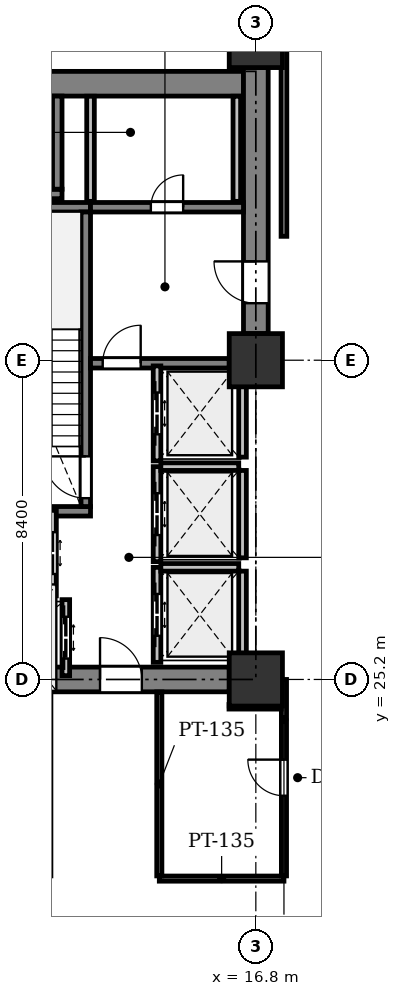
"""IFC4 building model, lengths in metres.
Left out: names, types, materials, properties, quantities, classifications, styles, units other than length and angle.
Written with IfcOpenShell. Run it as: python <this file> out.ifc"""

import sys

from ifc_helpers import new_model, si_unit, direction, frame, frame_2d, origin, origin_2d, place, context, subcontext, project, spatial, rectangle, extrude, element, fill, save


model = new_model("IFC4")
c1 = context("Model", 3, precision=1e-05, world=origin(), true_north=direction((0.0, 1.0)))
c2 = subcontext(c1, "Body", "Model", "MODEL_VIEW")
j1 = project(units=[si_unit("LENGTHUNIT", "METRE"), si_unit("PLANEANGLEUNIT", "RADIAN")], contexts=[c1])
p1 = place(None, origin())
s1 = spatial("IfcSite", under=j1, at=p1, CompositionType="ELEMENT")
p2 = place(p1, origin())
s2 = spatial("IfcBuilding", under=s1, at=p2, CompositionType="ELEMENT")
p3 = place(p2, frame((0.0, 0.0, 71.0)))
s3 = spatial("IfcBuildingStorey", under=s2, at=p3, CompositionType="ELEMENT", Elevation=71.0)
for number, where, z_axis, x_axis in (
    (1, (16.8, 25.2, 0.0), (0.0, 0.0, 1.0), (1.0, 0.0, 0.0)),
    (2, (16.8, 33.6, 0.0), (0.0, 0.0, 1.0), (1.0, 0.0, 0.0)),
    (3, (16.8, 42.0, 0.0), (0.0, 0.0, 1.0), (1.0, 0.0, 0.0)),
):
    element("IfcColumn", number, at=place(p3, frame(where, z_axis=z_axis, x_axis=x_axis)), inside=s3, PredefinedType="COLUMN", context=c2, shape_type="SweptSolid", body=[
        extrude(rectangle(XDim=1.4, YDim=1.4, at=origin_2d()), origin(), (0.0, 0.0, 1.0), 4.2),
    ])
p4 = place(p3, frame((8.725, 40.875, 0.0), z_axis=(0.0, 0.0, 1.0), x_axis=(1.0, 0.0, 0.0)))
e4 = element("IfcWall", 4, at=p4, inside=s3, PredefinedType="SHEAR", context=c2, shape_type="SweptSolid", body=[
    extrude(rectangle(XDim=7.75, YDim=0.65, at=frame_2d((3.875, 0.0))), origin(), (0.0, 0.0, 1.0), 3.925),
])
p5 = place(p3, frame((16.8, 34.3, 0.0), z_axis=(0.0, 0.0, 1.0), x_axis=(0.0, 1.0, 0.0)))
e5 = element("IfcWall", 5, at=p5, inside=s3, PredefinedType="SHEAR", context=c2, shape_type="SweptSolid", body=[
    extrude(rectangle(XDim=7.0, YDim=0.65, at=frame_2d((3.5, 0.0))), origin(), (0.0, 0.0, 1.0), 3.925),
])
p6 = place(p5, frame((0.8, 0.0, 0.0)))
e6 = element("IfcOpeningElement", 6, at=p6, cuts=e5, PredefinedType="OPENING", context=c2, shape_type="SweptSolid", body=[
    extrude(rectangle(XDim=1.1, YDim=2.15, at=frame_2d((0.55, 1.075))), frame((0.0, 0.335, 0.0), z_axis=(0.0, -1.0, 0.0), x_axis=(1.0, 0.0, 0.0)), (0.0, 0.0, 1.0), 0.67),
])
p7 = place(p3, frame((9.1, 25.2, 0.0), z_axis=(0.0, 0.0, 1.0), x_axis=(1.0, 0.0, 0.0)))
e7 = element("IfcWall", 7, at=p7, inside=s3, PredefinedType="SHEAR", context=c2, shape_type="SweptSolid", body=[
    extrude(rectangle(XDim=7.0, YDim=0.65, at=frame_2d((3.5, 0.0))), origin(), (0.0, 0.0, 1.0), 3.925),
])
p8 = place(p7, frame((3.6, 0.0, 0.0)))
e8 = element("IfcOpeningElement", 8, at=p8, cuts=e7, PredefinedType="OPENING", context=c2, shape_type="SweptSolid", body=[
    extrude(rectangle(XDim=1.1, YDim=2.15, at=frame_2d((0.55, 1.075))), frame((0.0, 0.335, 0.0), z_axis=(0.0, -1.0, 0.0), x_axis=(1.0, 0.0, 0.0)), (0.0, 0.0, 1.0), 0.67),
])
for number, where, z_axis, x_axis in (
    (9, (12.45, 29.625, 0.0), (0.0, 0.0, 1.0), (-1.0, 0.0, 0.0)),
    (10, (12.45, 37.625, 0.0), (0.0, 0.0, 1.0), (-1.0, 0.0, 0.0)),
):
    element("IfcWall", number, at=place(p3, frame(where, z_axis=z_axis, x_axis=x_axis)), inside=s3, PredefinedType="SHEAR", context=c2, shape_type="SweptSolid", body=[
        extrude(rectangle(XDim=3.75, YDim=0.25, at=frame_2d((1.875, 0.0))), origin(), (0.0, 0.0, 1.0), 3.925),
    ])
p9 = place(p3, frame((12.325, 29.75, 0.0), z_axis=(0.0, 0.0, 1.0), x_axis=(0.0, 1.0, 0.0)))
e11 = element("IfcWall", 11, at=p9, inside=s3, PredefinedType="SHEAR", context=c2, shape_type="SweptSolid", body=[
    extrude(rectangle(XDim=7.75, YDim=0.25, at=frame_2d((3.875, 0.0))), origin(), (0.0, 0.0, 1.0), 3.925),
])
p10 = place(p9, frame((0.22, 0.0, 0.0)))
e12 = element("IfcOpeningElement", 12, at=p10, cuts=e11, PredefinedType="OPENING", context=c2, shape_type="SweptSolid", body=[
    extrude(rectangle(XDim=1.1, YDim=2.15, at=frame_2d((0.55, 1.075))), frame((0.0, 0.135, 0.0), z_axis=(0.0, -1.0, 0.0), x_axis=(1.0, 0.0, 0.0)), (0.0, 0.0, 1.0), 0.27),
])
p11 = place(p3, frame((8.725, 37.975, 0.0), z_axis=(0.0, 0.0, 1.0), x_axis=(1.0, 0.0, 0.0)))
e13 = element("IfcWall", 13, at=p11, inside=s3, PredefinedType="SHEAR", context=c2, shape_type="SweptSolid", body=[
    extrude(rectangle(XDim=2.975, YDim=0.25, at=frame_2d((1.487, 0.0))), origin(), (0.0, 0.0, 1.0), 3.925),
])
p12 = place(p3, frame((11.575, 38.1, 0.0), z_axis=(0.0, 0.0, 1.0), x_axis=(0.0, 1.0, 0.0)))
e14 = element("IfcWall", 14, at=p12, inside=s3, PredefinedType="SHEAR", context=c2, shape_type="SweptSolid", body=[
    extrude(rectangle(XDim=2.45, YDim=0.25, at=frame_2d((1.225, 0.0))), origin(), (0.0, 0.0, 1.0), 3.925),
])
p13 = place(p3, frame((12.45, 33.52, 0.0), z_axis=(0.0, 0.0, 1.0), x_axis=(1.0, 0.0, 0.0)))
e15 = element("IfcWall", 15, at=p13, inside=s3, PredefinedType="SHEAR", context=c2, shape_type="SweptSolid", body=[
    extrude(rectangle(XDim=3.65, YDim=0.25, at=frame_2d((1.825, 0.0))), origin(), (0.0, 0.0, 1.0), 3.925),
])
p14 = place(p13, frame((0.32, 0.0, 0.0)))
e16 = element("IfcOpeningElement", 16, at=p14, cuts=e15, PredefinedType="OPENING", context=c2, shape_type="SweptSolid", body=[
    extrude(rectangle(XDim=1.0, YDim=2.15, at=frame_2d((0.5, 1.075))), frame((0.0, 0.135, 0.0), z_axis=(0.0, -1.0, 0.0), x_axis=(1.0, 0.0, 0.0)), (0.0, 0.0, 1.0), 0.27),
])
p15 = place(p3, frame((12.45, 37.625, 0.0), z_axis=(0.0, 0.0, 1.0), x_axis=(1.0, 0.0, 0.0)))
e17 = element("IfcWall", 17, at=p15, inside=s3, PredefinedType="SHEAR", context=c2, shape_type="SweptSolid", body=[
    extrude(rectangle(XDim=4.025, YDim=0.25, at=frame_2d((2.013, 0.0))), origin(), (0.0, 0.0, 1.0), 3.925),
])
p16 = place(p15, frame((1.587, 0.0, 0.0)))
e18 = element("IfcOpeningElement", 18, at=p16, cuts=e17, PredefinedType="OPENING", context=c2, shape_type="SweptSolid", body=[
    extrude(rectangle(XDim=0.85, YDim=2.15, at=frame_2d((0.425, 1.075))), frame((0.0, 0.135, 0.0), z_axis=(0.0, -1.0, 0.0), x_axis=(1.0, 0.0, 0.0)), (0.0, 0.0, 1.0), 0.27),
])
p17 = place(p3, frame((11.45, 27.4, 0.0), z_axis=(0.0, 0.0, 1.0), x_axis=(0.0, 1.0, 0.0)))
e19 = element("IfcWall", 19, at=p17, inside=s3, PredefinedType="PARTITIONING", context=c2, shape_type="SweptSolid", body=[
    extrude(rectangle(XDim=2.25, YDim=0.2, at=frame_2d((1.125, 0.0))), origin(), (0.0, 0.0, 1.0), 3.925),
])
p18 = place(p17, frame((0.575, 0.0, 0.0)))
e20 = element("IfcOpeningElement", 20, at=p18, cuts=e19, PredefinedType="OPENING", context=c2, shape_type="SweptSolid", body=[
    extrude(rectangle(XDim=1.1, YDim=2.2, at=frame_2d((0.55, 1.1))), frame((0.0, 0.11, 0.0), z_axis=(0.0, -1.0, 0.0), x_axis=(1.0, 0.0, 0.0)), (0.0, 0.0, 1.0), 0.22),
])
p19 = place(p3, frame((11.8, 25.3, 0.0), z_axis=(0.0, 0.0, 1.0), x_axis=(0.0, 1.0, 0.0)))
e21 = element("IfcWall", 21, at=p19, inside=s3, PredefinedType="PARTITIONING", context=c2, shape_type="SweptSolid", body=[
    extrude(rectangle(XDim=2.0, YDim=0.2, at=frame_2d((1.0, 0.0))), origin(), (0.0, 0.0, 1.0), 3.925),
])
p20 = place(p19, frame((0.45, 0.0, 0.0)))
e22 = element("IfcOpeningElement", 22, at=p20, cuts=e21, PredefinedType="OPENING", context=c2, shape_type="SweptSolid", body=[
    extrude(rectangle(XDim=1.1, YDim=2.2, at=frame_2d((0.55, 1.1))), frame((0.0, 0.11, 0.0), z_axis=(0.0, -1.0, 0.0), x_axis=(1.0, 0.0, 0.0)), (0.0, 0.0, 1.0), 0.22),
])
p21 = place(p3, frame((14.2, 25.65, 0.0), z_axis=(0.0, 0.0, 1.0), x_axis=(0.0, 1.0, 0.0)))
e23 = element("IfcWall", 23, at=p21, inside=s3, PredefinedType="PARTITIONING", context=c2, shape_type="SweptSolid", body=[
    extrude(rectangle(XDim=2.5, YDim=0.2, at=frame_2d((1.25, 0.0))), origin(), (0.0, 0.0, 1.0), 3.925),
])
p22 = place(p21, frame((0.7, 0.0, 0.0)))
e24 = element("IfcOpeningElement", 24, at=p22, cuts=e23, PredefinedType="OPENING", context=c2, shape_type="SweptSolid", body=[
    extrude(rectangle(XDim=1.1, YDim=2.2, at=frame_2d((0.55, 1.1))), frame((0.0, 0.11, 0.0), z_axis=(0.0, -1.0, 0.0), x_axis=(1.0, 0.0, 0.0)), (0.0, 0.0, 1.0), 0.22),
])
p23 = place(p3, frame((16.45, 25.75, 0.0), z_axis=(0.0, 0.0, 1.0), x_axis=(0.0, 1.0, 0.0)))
e25 = element("IfcWall", 25, at=p23, inside=s3, PredefinedType="PARTITIONING", context=c2, shape_type="SweptSolid", body=[
    extrude(rectangle(XDim=2.3, YDim=0.2, at=frame_2d((1.15, 0.0))), origin(), (0.0, 0.0, 1.0), 3.925),
])
p24 = place(p3, frame((14.3, 28.15, 0.0), z_axis=(0.0, 0.0, 1.0), x_axis=(1.0, 0.0, 0.0)))
e26 = element("IfcWall", 26, at=p24, inside=s3, PredefinedType="PARTITIONING", context=c2, shape_type="SweptSolid", body=[
    extrude(rectangle(XDim=2.05, YDim=0.2, at=frame_2d((1.025, 0.0))), origin(), (0.0, 0.0, 1.0), 3.925),
])
p25 = place(p3, frame((14.2, 28.3, 0.0), z_axis=(0.0, 0.0, 1.0), x_axis=(0.0, 1.0, 0.0)))
e27 = element("IfcWall", 27, at=p25, inside=s3, PredefinedType="PARTITIONING", context=c2, shape_type="SweptSolid", body=[
    extrude(rectangle(XDim=2.5, YDim=0.2, at=frame_2d((1.25, 0.0))), origin(), (0.0, 0.0, 1.0), 3.925),
])
p26 = place(p25, frame((0.7, 0.0, 0.0)))
e28 = element("IfcOpeningElement", 28, at=p26, cuts=e27, PredefinedType="OPENING", context=c2, shape_type="SweptSolid", body=[
    extrude(rectangle(XDim=1.1, YDim=2.2, at=frame_2d((0.55, 1.1))), frame((0.0, 0.11, 0.0), z_axis=(0.0, -1.0, 0.0), x_axis=(1.0, 0.0, 0.0)), (0.0, 0.0, 1.0), 0.22),
])
p27 = place(p3, frame((16.45, 28.4, 0.0), z_axis=(0.0, 0.0, 1.0), x_axis=(0.0, 1.0, 0.0)))
e29 = element("IfcWall", 29, at=p27, inside=s3, PredefinedType="PARTITIONING", context=c2, shape_type="SweptSolid", body=[
    extrude(rectangle(XDim=2.3, YDim=0.2, at=frame_2d((1.15, 0.0))), origin(), (0.0, 0.0, 1.0), 3.925),
])
p28 = place(p3, frame((14.3, 30.8, 0.0), z_axis=(0.0, 0.0, 1.0), x_axis=(1.0, 0.0, 0.0)))
e30 = element("IfcWall", 30, at=p28, inside=s3, PredefinedType="PARTITIONING", context=c2, shape_type="SweptSolid", body=[
    extrude(rectangle(XDim=2.05, YDim=0.2, at=frame_2d((1.025, 0.0))), origin(), (0.0, 0.0, 1.0), 3.925),
])
p29 = place(p3, frame((14.2, 30.95, 0.0), z_axis=(0.0, 0.0, 1.0), x_axis=(0.0, 1.0, 0.0)))
e31 = element("IfcWall", 31, at=p29, inside=s3, PredefinedType="PARTITIONING", context=c2, shape_type="SweptSolid", body=[
    extrude(rectangle(XDim=2.5, YDim=0.2, at=frame_2d((1.25, 0.0))), origin(), (0.0, 0.0, 1.0), 3.925),
])
p30 = place(p29, frame((0.7, 0.0, 0.0)))
e32 = element("IfcOpeningElement", 32, at=p30, cuts=e31, PredefinedType="OPENING", context=c2, shape_type="SweptSolid", body=[
    extrude(rectangle(XDim=1.1, YDim=2.2, at=frame_2d((0.55, 1.1))), frame((0.0, 0.11, 0.0), z_axis=(0.0, -1.0, 0.0), x_axis=(1.0, 0.0, 0.0)), (0.0, 0.0, 1.0), 0.22),
])
p31 = place(p3, frame((16.45, 31.05, 0.0), z_axis=(0.0, 0.0, 1.0), x_axis=(0.0, 1.0, 0.0)))
e33 = element("IfcWall", 33, at=p31, inside=s3, PredefinedType="PARTITIONING", context=c2, shape_type="SweptSolid", body=[
    extrude(rectangle(XDim=2.3, YDim=0.2, at=frame_2d((1.15, 0.0))), origin(), (0.0, 0.0, 1.0), 3.925),
])
for number, where, z_axis, x_axis in (
    (34, (16.3, 37.78, 0.0), (0.0, 0.0, 1.0), (0.0, 1.0, 0.0)),
    (35, (12.45, 40.546, 0.0), (0.0, 0.0, 1.0), (0.0, -1.0, 0.0)),
):
    element("IfcWall", number, at=place(p3, frame(where, z_axis=z_axis, x_axis=x_axis)), inside=s3, PredefinedType="PARTITIONING", context=c2, shape_type="SweptSolid", body=[
        extrude(rectangle(XDim=2.766, YDim=0.2, at=frame_2d((1.383, 0.0))), origin(), (0.0, 0.0, 1.0), 2.825),
    ])
p32 = place(p3, frame((14.26, 19.96, 0.0), z_axis=(0.0, 0.0, 1.0), x_axis=(1.0, 0.0, 0.0)))
e36 = element("IfcWall", 36, at=p32, inside=s3, PredefinedType="PARTITIONING", context=c2, shape_type="SweptSolid", body=[
    extrude(rectangle(XDim=3.28, YDim=0.135, at=frame_2d((1.64, 0.0))), origin(), (0.0, 0.0, 1.0), 3.323),
])
p33 = place(p3, frame((17.54, 20.031, 0.0), z_axis=(0.0, 0.0, 1.0), x_axis=(0.0, 1.0, 0.0)))
e37 = element("IfcWall", 37, at=p33, inside=s3, PredefinedType="PARTITIONING", context=c2, shape_type="SweptSolid", body=[
    extrude(rectangle(XDim=5.168, YDim=0.135, at=frame_2d((2.584, 0.0))), origin(), (0.0, 0.0, 1.0), 3.313),
])
p34 = place(p33, frame((2.109, 0.0, 0.0)))
e38 = element("IfcOpeningElement", 38, at=p34, cuts=e37, PredefinedType="OPENING", context=c2, shape_type="SweptSolid", body=[
    extrude(rectangle(XDim=0.95, YDim=2.15, at=frame_2d((0.475, 1.075))), frame((0.0, 0.077, 0.0), z_axis=(0.0, -1.0, 0.0), x_axis=(1.0, 0.0, 0.0)), (0.0, 0.0, 1.0), 0.155),
])
p35 = place(p3, frame((17.469, 24.48, 0.0), z_axis=(0.0, 0.0, 1.0), x_axis=(-0.99999974752, 0.000710605612, 0.0)))
e39 = element("IfcWall", 39, at=p35, inside=s3, PredefinedType="PARTITIONING", context=c2, shape_type="SweptSolid", body=[
    extrude(rectangle(XDim=1.374, YDim=0.12, at=frame_2d((0.687, 0.0))), origin(), (0.0, 0.0, 1.0), 3.323),
])
p36 = place(p3, frame((14.26, 24.871, 0.0), z_axis=(0.0, 0.0, 1.0), x_axis=(0.0, -1.0, 0.0)))
e40 = element("IfcWall", 40, at=p36, inside=s3, PredefinedType="PARTITIONING", context=c2, shape_type="SweptSolid", body=[
    extrude(rectangle(XDim=4.84, YDim=0.135, at=frame_2d((2.42, 0.0))), origin(), (0.0, 0.0, 1.0), 3.925),
])
p37 = place(p3, frame((17.54, 36.86, 0.0), z_axis=(0.0, 0.0, 1.0), x_axis=(0.0, 1.0, 0.0)))
e41 = element("IfcWall", 41, at=p37, inside=s3, PredefinedType="PARTITIONING", context=c2, shape_type="SweptSolid", body=[
    extrude(rectangle(XDim=6.14, YDim=0.15, at=frame_2d((3.07, 0.0))), origin(), (0.0, 0.0, 1.0), 3.313),
])
p38 = place(p6, origin())
e42 = element("IfcDoor", 42, at=p38, inside=s3, OperationType="SINGLE_SWING_RIGHT", PredefinedType="DOOR", context=c2, shape_type="SweptSolid", body=[
    extrude(rectangle(XDim=1.1, YDim=2.15, at=frame_2d((0.55, 1.075))), frame((0.0, 0.025, 0.0), z_axis=(0.0, -1.0, 0.0), x_axis=(1.0, 0.0, 0.0)), (0.0, 0.0, 1.0), 0.05),
])
fill(e6, e42)
p39 = place(p8, origin())
e43 = element("IfcDoor", 43, at=p39, inside=s3, OperationType="SINGLE_SWING_LEFT", PredefinedType="DOOR", context=c2, shape_type="SweptSolid", body=[
    extrude(rectangle(XDim=1.1, YDim=2.15, at=frame_2d((0.55, 1.075))), frame((0.0, 0.025, 0.0), z_axis=(0.0, -1.0, 0.0), x_axis=(1.0, 0.0, 0.0)), (0.0, 0.0, 1.0), 0.05),
])
fill(e8, e43)
p40 = place(p10, origin())
e44 = element("IfcDoor", 44, at=p40, inside=s3, OperationType="SINGLE_SWING_RIGHT", PredefinedType="DOOR", context=c2, shape_type="SweptSolid", body=[
    extrude(rectangle(XDim=1.1, YDim=2.15, at=frame_2d((0.55, 1.075))), frame((0.0, 0.025, 0.0), z_axis=(0.0, -1.0, 0.0), x_axis=(1.0, 0.0, 0.0)), (0.0, 0.0, 1.0), 0.05),
])
fill(e12, e44)
p41 = place(p14, origin())
e45 = element("IfcDoor", 45, at=p41, inside=s3, OperationType="SINGLE_SWING_RIGHT", PredefinedType="DOOR", context=c2, shape_type="SweptSolid", body=[
    extrude(rectangle(XDim=1.0, YDim=2.15, at=frame_2d((0.5, 1.075))), frame((0.0, 0.025, 0.0), z_axis=(0.0, -1.0, 0.0), x_axis=(1.0, 0.0, 0.0)), (0.0, 0.0, 1.0), 0.05),
])
fill(e16, e45)
p42 = place(p18, origin())
e46 = element("IfcDoor", 46, at=p42, inside=s3, OperationType="DOUBLE_DOOR_SLIDING", PredefinedType="DOOR", context=c2, shape_type="SweptSolid", body=[
    extrude(rectangle(XDim=1.1, YDim=2.2, at=frame_2d((0.55, 1.1))), frame((0.0, 0.025, 0.0), z_axis=(0.0, -1.0, 0.0), x_axis=(1.0, 0.0, 0.0)), (0.0, 0.0, 1.0), 0.05),
])
fill(e20, e46)
p43 = place(p20, origin())
e47 = element("IfcDoor", 47, at=p43, inside=s3, OperationType="DOUBLE_DOOR_SLIDING", PredefinedType="DOOR", context=c2, shape_type="SweptSolid", body=[
    extrude(rectangle(XDim=1.1, YDim=2.2, at=frame_2d((0.55, 1.1))), frame((0.0, 0.025, 0.0), z_axis=(0.0, -1.0, 0.0), x_axis=(1.0, 0.0, 0.0)), (0.0, 0.0, 1.0), 0.05),
])
fill(e22, e47)
p44 = place(p22, origin())
e48 = element("IfcDoor", 48, at=p44, inside=s3, OperationType="DOUBLE_DOOR_SLIDING", PredefinedType="DOOR", context=c2, shape_type="SweptSolid", body=[
    extrude(rectangle(XDim=1.1, YDim=2.2, at=frame_2d((0.55, 1.1))), frame((0.0, 0.025, 0.0), z_axis=(0.0, -1.0, 0.0), x_axis=(1.0, 0.0, 0.0)), (0.0, 0.0, 1.0), 0.05),
])
fill(e24, e48)
p45 = place(p26, origin())
e49 = element("IfcDoor", 49, at=p45, inside=s3, OperationType="DOUBLE_DOOR_SLIDING", PredefinedType="DOOR", context=c2, shape_type="SweptSolid", body=[
    extrude(rectangle(XDim=1.1, YDim=2.2, at=frame_2d((0.55, 1.1))), frame((0.0, 0.025, 0.0), z_axis=(0.0, -1.0, 0.0), x_axis=(1.0, 0.0, 0.0)), (0.0, 0.0, 1.0), 0.05),
])
fill(e28, e49)
p46 = place(p30, origin())
e50 = element("IfcDoor", 50, at=p46, inside=s3, OperationType="DOUBLE_DOOR_SLIDING", PredefinedType="DOOR", context=c2, shape_type="SweptSolid", body=[
    extrude(rectangle(XDim=1.1, YDim=2.2, at=frame_2d((0.55, 1.1))), frame((0.0, 0.025, 0.0), z_axis=(0.0, -1.0, 0.0), x_axis=(1.0, 0.0, 0.0)), (0.0, 0.0, 1.0), 0.05),
])
fill(e32, e50)
p47 = place(p16, origin())
e51 = element("IfcDoor", 51, at=p47, inside=s3, OperationType="SINGLE_SWING_RIGHT", PredefinedType="DOOR", context=c2, shape_type="SweptSolid", body=[
    extrude(rectangle(XDim=0.85, YDim=2.15, at=frame_2d((0.425, 1.075))), frame((0.0, 0.025, 0.0), z_axis=(0.0, -1.0, 0.0), x_axis=(1.0, 0.0, 0.0)), (0.0, 0.0, 1.0), 0.05),
])
fill(e18, e51)
p48 = place(p34, origin())
e52 = element("IfcDoor", 52, at=p48, inside=s3, OperationType="SINGLE_SWING_RIGHT", PredefinedType="DOOR", context=c2, shape_type="SweptSolid", body=[
    extrude(rectangle(XDim=0.95, YDim=2.15, at=frame_2d((0.475, 1.075))), frame((0.0, 0.025, 0.0), z_axis=(0.0, -1.0, 0.0), x_axis=(1.0, 0.0, 0.0)), (0.0, 0.0, 1.0), 0.05),
])
fill(e38, e52)
save(model, sys.argv[1])
